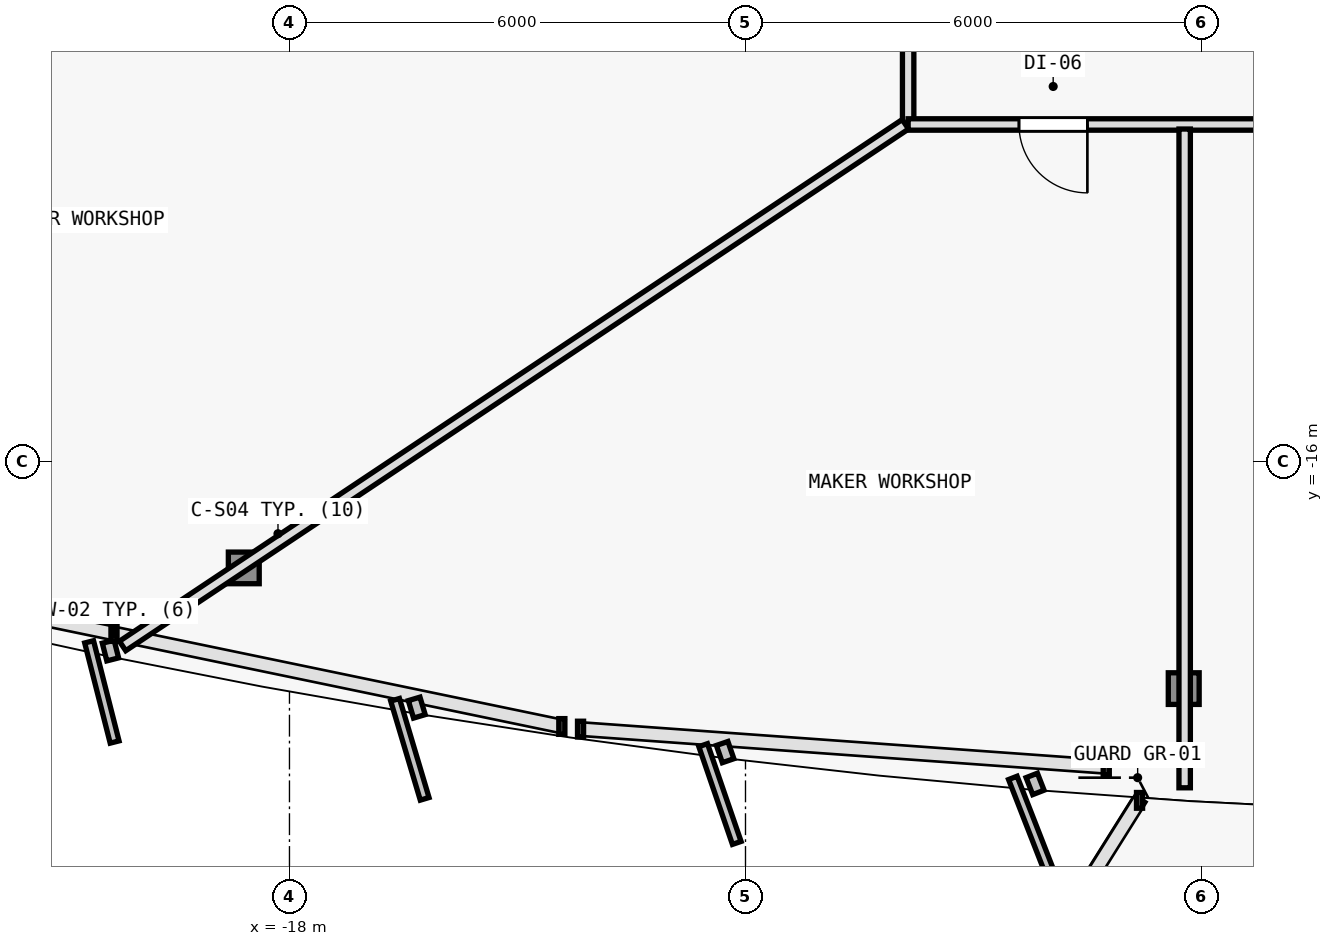
"""IFC4 building model, lengths in metres.
Left out: names, types, materials, properties, quantities, classifications, styles, units other than length and angle.
Written with IfcOpenShell. Run it as: python <this file> out.ifc"""

import sys

from ifc_helpers import new_model, si_unit, direction, frame, frame_2d, origin, origin_2d, place, context, subcontext, project, spatial, rectangle, i_section, extrude, element, fill, save


model = new_model("IFC4")
c1 = context("Model", 3, precision=1e-05, world=origin(), true_north=direction((0.0, 1.0)))
c2 = subcontext(c1, "Body", "Model", "MODEL_VIEW")
j1 = project(units=[si_unit("LENGTHUNIT", "METRE"), si_unit("PLANEANGLEUNIT", "RADIAN")], contexts=[c1])
p1 = place(None, origin())
s1 = spatial("IfcSite", under=j1, at=p1, CompositionType="ELEMENT")
p2 = place(p1, origin())
s2 = spatial("IfcBuilding", under=s1, at=p2, CompositionType="ELEMENT")
p3 = place(p2, frame((0.0, 0.0, 114.9)))
s3 = spatial("IfcBuildingStorey", under=s2, at=p3, CompositionType="ELEMENT", Elevation=114.9)
p4 = place(p3, frame((-18.601, -17.394, 0.006), z_axis=(0.020596339702, 0.033443561496, 0.99922836178), x_axis=(-0.851480003019, 0.52438707503, 0.0)))
e1 = element("IfcColumn", 1, at=p4, inside=s3, PredefinedType="COLUMN", context=c2, shape_type="SweptSolid", body=[
    extrude(i_section(OverallWidth=0.406, OverallDepth=0.416, WebThickness=0.019, FlangeThickness=0.031, FilletRadius=0.015, at=origin_2d()), origin(), (0.0, 0.0, 1.0), 3.592),
])
p5 = place(p3, frame((-6.234, -18.982, 0.006), z_axis=(0.006866308162, 0.0352833063, 0.999353762243), x_axis=(-0.981585848295, 0.191021523464, 0.0)))
e2 = element("IfcColumn", 2, at=p5, inside=s3, PredefinedType="COLUMN", context=c2, shape_type="SweptSolid", body=[
    extrude(i_section(OverallWidth=0.406, OverallDepth=0.416, WebThickness=0.019, FlangeThickness=0.031, FilletRadius=0.015, at=origin_2d()), origin(), (0.0, 0.0, 1.0), 3.591),
])
p6 = place(p3, frame((-9.86, -11.56, 0.0), z_axis=(0.0, 0.0, 1.0), x_axis=(0.0, 1.0, 0.0)))
e3 = element("IfcWall", 3, at=p6, inside=s3, PredefinedType="PARTITIONING", context=c2, shape_type="SweptSolid", body=[
    extrude(rectangle(XDim=19.986, YDim=0.15, at=frame_2d((9.993, 0.0))), origin(), (0.0, 0.0, 1.0), 2.705),
])
p7 = place(p6, frame((11.213, 0.0, 0.0)))
e4 = element("IfcOpeningElement", 4, at=p7, cuts=e3, PredefinedType="OPENING", context=c2, shape_type="SweptSolid", body=[
    extrude(rectangle(XDim=0.85, YDim=2.1, at=frame_2d((0.425, 1.05))), frame((0.0, 0.085, 0.0), z_axis=(0.0, -1.0, 0.0), x_axis=(1.0, 0.0, 0.0)), (0.0, 0.0, 1.0), 0.17),
])
p8 = place(p6, frame((9.749, 0.0, 0.0)))
e5 = element("IfcOpeningElement", 5, at=p8, cuts=e3, PredefinedType="OPENING", context=c2, shape_type="SweptSolid", body=[
    extrude(rectangle(XDim=0.85, YDim=2.1, at=frame_2d((0.425, 1.05))), frame((0.0, 0.085, 0.0), z_axis=(0.0, -1.0, 0.0), x_axis=(1.0, 0.0, 0.0)), (0.0, 0.0, 1.0), 0.17),
])
p9 = place(p6, frame((8.192, 0.0, 0.0)))
e6 = element("IfcOpeningElement", 6, at=p9, cuts=e3, PredefinedType="OPENING", context=c2, shape_type="SweptSolid", body=[
    extrude(rectangle(XDim=0.85, YDim=2.1, at=frame_2d((0.425, 1.05))), frame((0.0, 0.085, 0.0), z_axis=(0.0, -1.0, 0.0), x_axis=(1.0, 0.0, 0.0)), (0.0, 0.0, 1.0), 0.17),
])
p10 = place(p6, frame((6.69, 0.0, 0.0)))
e7 = element("IfcOpeningElement", 7, at=p10, cuts=e3, PredefinedType="OPENING", context=c2, shape_type="SweptSolid", body=[
    extrude(rectangle(XDim=0.85, YDim=2.1, at=frame_2d((0.425, 1.05))), frame((0.0, 0.085, 0.0), z_axis=(0.0, -1.0, 0.0), x_axis=(1.0, 0.0, 0.0)), (0.0, 0.0, 1.0), 0.17),
])
p11 = place(p6, frame((5.3, 0.0, 0.0)))
e8 = element("IfcOpeningElement", 8, at=p11, cuts=e3, PredefinedType="OPENING", context=c2, shape_type="SweptSolid", body=[
    extrude(rectangle(XDim=0.85, YDim=2.1, at=frame_2d((0.425, 1.05))), frame((0.0, 0.085, 0.0), z_axis=(0.0, -1.0, 0.0), x_axis=(1.0, 0.0, 0.0)), (0.0, 0.0, 1.0), 0.17),
])
p12 = place(p6, frame((3.874, 0.0, 0.0)))
e9 = element("IfcOpeningElement", 9, at=p12, cuts=e3, PredefinedType="OPENING", context=c2, shape_type="SweptSolid", body=[
    extrude(rectangle(XDim=0.85, YDim=2.1, at=frame_2d((0.425, 1.05))), frame((0.0, 0.085, 0.0), z_axis=(0.0, -1.0, 0.0), x_axis=(1.0, 0.0, 0.0)), (0.0, 0.0, 1.0), 0.17),
])
p13 = place(p6, frame((1.426, 0.0, 0.0)))
e10 = element("IfcOpeningElement", 10, at=p13, cuts=e3, PredefinedType="OPENING", context=c2, shape_type="SweptSolid", body=[
    extrude(rectangle(XDim=0.9, YDim=2.1, at=frame_2d((0.45, 1.05))), frame((0.0, 0.085, 0.0), z_axis=(0.0, -1.0, 0.0), x_axis=(1.0, 0.0, 0.0)), (0.0, 0.0, 1.0), 0.17),
])
p14 = place(p6, frame((13.007, 0.0, 0.0)))
e11 = element("IfcOpeningElement", 11, at=p14, cuts=e3, PredefinedType="OPENING", context=c2, shape_type="SweptSolid", body=[
    extrude(rectangle(XDim=0.9, YDim=2.1, at=frame_2d((0.45, 1.05))), frame((0.0, 0.085, 0.0), z_axis=(0.0, -1.0, 0.0), x_axis=(1.0, 0.0, 0.0)), (0.0, 0.0, 1.0), 0.17),
])
p15 = place(p3, frame((13.18, -11.56, 0.0), z_axis=(0.0, 0.0, 1.0), x_axis=(-1.0, 0.0, 0.0)))
e12 = element("IfcWall", 12, at=p15, inside=s3, PredefinedType="PARTITIONING", context=c2, shape_type="SweptSolid", body=[
    extrude(rectangle(XDim=23.04, YDim=0.15, at=frame_2d((11.52, 0.0))), origin(), (0.0, 0.0, 1.0), 2.775),
])
p16 = place(p15, frame((20.682, 0.0, 0.0)))
e13 = element("IfcOpeningElement", 13, at=p16, cuts=e12, PredefinedType="OPENING", context=c2, shape_type="SweptSolid", body=[
    extrude(rectangle(XDim=0.9, YDim=2.1, at=frame_2d((0.45, 1.05))), frame((0.0, 0.085, 0.0), z_axis=(0.0, -1.0, 0.0), x_axis=(1.0, 0.0, 0.0)), (0.0, 0.0, 1.0), 0.17),
])
p17 = place(p15, frame((12.73, 0.0, 0.0)))
e14 = element("IfcOpeningElement", 14, at=p17, cuts=e12, PredefinedType="OPENING", context=c2, shape_type="SweptSolid", body=[
    extrude(rectangle(XDim=0.9, YDim=2.1, at=frame_2d((0.45, 1.05))), frame((0.0, 0.085, 0.0), z_axis=(0.0, -1.0, 0.0), x_axis=(1.0, 0.0, 0.0)), (0.0, 0.0, 1.0), 0.17),
])
p18 = place(p15, frame((3.118, 0.0, 0.0)))
e15 = element("IfcOpeningElement", 15, at=p18, cuts=e12, PredefinedType="OPENING", context=c2, shape_type="SweptSolid", body=[
    extrude(rectangle(XDim=0.9, YDim=2.1, at=frame_2d((0.45, 1.05))), frame((0.0, 0.085, 0.0), z_axis=(0.0, -1.0, 0.0), x_axis=(1.0, 0.0, 0.0)), (0.0, 0.0, 1.0), 0.17),
])
p19 = place(p3, frame((-9.896, -11.558, 0.0), z_axis=(0.0, 0.0, 1.0), x_axis=(-0.832159529694, -0.554536308225, 0.0)))
e16 = element("IfcWall", 16, at=p19, inside=s3, PredefinedType="PARTITIONING", context=c2, shape_type="SweptSolid", body=[
    extrude(rectangle(XDim=12.377, YDim=0.15, at=frame_2d((6.188, 0.0))), origin(), (0.0, 0.0, 1.0), 2.775),
])
p20 = place(p3, frame((-6.222, -11.62, 0.0), z_axis=(0.0, 0.0, 1.0), x_axis=(0.0, -1.0, 0.0)))
e17 = element("IfcWall", 17, at=p20, inside=s3, PredefinedType="PARTITIONING", context=c2, shape_type="SweptSolid", body=[
    extrude(rectangle(XDim=8.667, YDim=0.15, at=frame_2d((4.333, 0.0))), origin(), (0.0, 0.0, 1.0), 2.775),
])
p21 = place(p16, origin())
e18 = element("IfcDoor", 18, at=p21, inside=s3, OperationType="SINGLE_SWING_LEFT", PredefinedType="DOOR", context=c2, shape_type="SweptSolid", body=[
    extrude(rectangle(XDim=0.9, YDim=2.1, at=frame_2d((0.45, 1.05))), frame((0.0, 0.025, 0.0), z_axis=(0.0, -1.0, 0.0), x_axis=(1.0, 0.0, 0.0)), (0.0, 0.0, 1.0), 0.05),
])
fill(e13, e18)
save(model, sys.argv[1])
